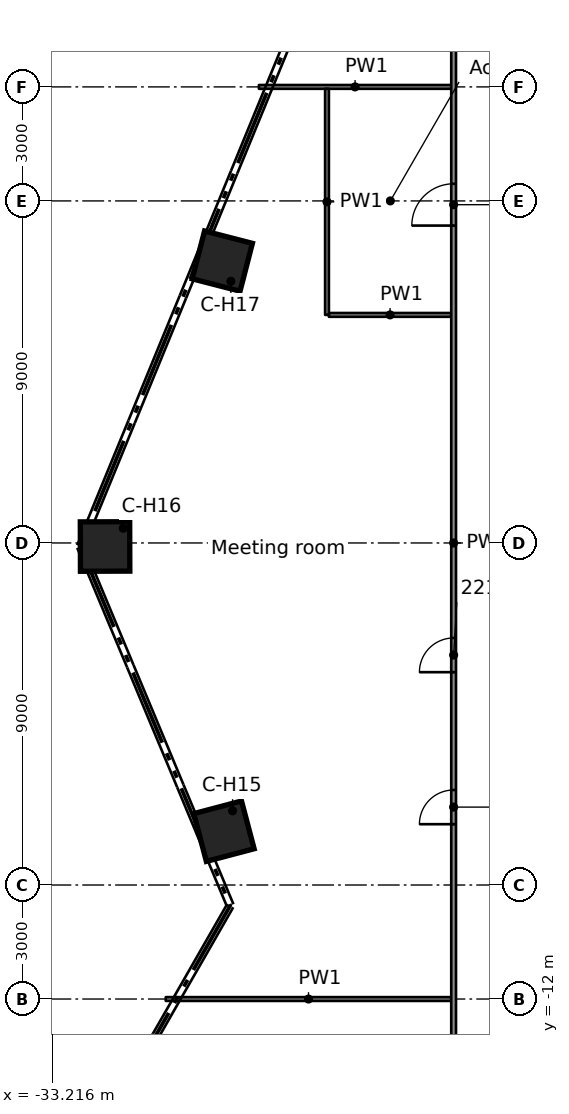
"""IFC4 building model, lengths in metres.
Left out: names, types, materials, properties, quantities, classifications, styles, units other than length and angle.
Written with IfcOpenShell. Run it as: python <this file> out.ifc"""

import sys

from ifc_helpers import new_model, si_unit, direction, frame, frame_2d, origin, origin_2d, place, context, subcontext, project, spatial, rectangle, extrude, element, fill, save


model = new_model("IFC4")
c1 = context("Model", 3, precision=1e-05, world=origin(), true_north=direction((0.0, 1.0)))
c2 = subcontext(c1, "Body", "Model", "MODEL_VIEW")
j1 = project(units=[si_unit("LENGTHUNIT", "METRE"), si_unit("PLANEANGLEUNIT", "RADIAN")], contexts=[c1])
p1 = place(None, origin())
s1 = spatial("IfcSite", under=j1, at=p1, CompositionType="ELEMENT")
p2 = place(p1, origin())
s2 = spatial("IfcBuilding", under=s1, at=p2, CompositionType="ELEMENT")
p3 = place(p2, frame((0.0, 0.0, 116.2)))
s3 = spatial("IfcBuildingStorey", under=s2, at=p3, CompositionType="ELEMENT", Elevation=116.2)
for number, where, z_axis, x_axis in (
    (1, (-28.694, -7.584, 0.0), (0.0, 0.0, 1.0), (-0.967, -0.256, 0.0)),
    (2, (-31.822, -0.093, 0.0), (0.0, 0.0, 1.0), (-1.0, -0.003, 0.0)),
    (3, (-28.737, 7.417, 0.0), (0.0, 0.0, 1.0), (-0.968, 0.25, 0.0)),
):
    element("IfcColumn", number, at=place(p3, frame(where, z_axis=z_axis, x_axis=x_axis)), inside=s3, PredefinedType="COLUMN", context=c2, shape_type="SweptSolid", body=[
        extrude(rectangle(XDim=1.3, YDim=1.3, at=origin_2d()), origin(), (0.0, 0.0, 1.0), 3.5),
    ])
p4 = place(p3, frame((-30.225, -12.0, 0.0), z_axis=(0.0, 0.0, 1.0), x_axis=(1.0, 0.0, 0.0)))
e4 = element("IfcWall", 4, at=p4, inside=s3, PredefinedType="PARTITIONING", context=c2, shape_type="SweptSolid", body=[
    extrude(rectangle(XDim=7.513, YDim=0.1, at=frame_2d((3.757, 0.0))), origin(), (0.0, 0.0, 1.0), 3.08),
])
p5 = place(p3, frame((-25.932, 6.001, 0.0), z_axis=(0.0, 0.0, 1.0), x_axis=(1.0, 0.0, 0.0)))
e5 = element("IfcWall", 5, at=p5, inside=s3, PredefinedType="PARTITIONING", context=c2, shape_type="SweptSolid", body=[
    extrude(rectangle(XDim=3.22, YDim=0.1, at=frame_2d((1.61, 0.0))), origin(), (0.0, 0.0, 1.0), 3.08),
])
p6 = place(p3, frame((-27.774, 12.0, 0.0), z_axis=(0.0, 0.0, 1.0), x_axis=(1.0, 0.0, 0.0)))
e6 = element("IfcWall", 6, at=p6, inside=s3, PredefinedType="PARTITIONING", context=c2, shape_type="SweptSolid", body=[
    extrude(rectangle(XDim=5.062, YDim=0.1, at=frame_2d((2.531, 0.0))), origin(), (0.0, 0.0, 1.0), 3.08),
])
p7 = place(p3, frame((-22.65, -15.651, 0.0), z_axis=(0.0, 0.0, 1.0), x_axis=(0.0, 1.0, 0.0)))
e7 = element("IfcWall", 7, at=p7, inside=s3, PredefinedType="PARTITIONING", context=c2, shape_type="SweptSolid", body=[
    extrude(rectangle(XDim=31.302, YDim=0.125, at=frame_2d((15.651, 0.0))), origin(), (0.0, 0.0, 1.0), 3.08),
])
p8 = place(p7, frame((8.251, 0.0, 0.0)))
e8 = element("IfcOpeningElement", 8, at=p8, cuts=e7, PredefinedType="OPENING", context=c2, shape_type="SweptSolid", body=[
    extrude(rectangle(XDim=0.9, YDim=2.1, at=frame_2d((0.45, 1.05))), frame((0.0, 0.073, 0.0), z_axis=(0.0, -1.0, 0.0), x_axis=(1.0, 0.0, 0.0)), (0.0, 0.0, 1.0), 0.145),
])
p9 = place(p7, frame((12.251, 0.0, 0.0)))
e9 = element("IfcOpeningElement", 9, at=p9, cuts=e7, PredefinedType="OPENING", context=c2, shape_type="SweptSolid", body=[
    extrude(rectangle(XDim=0.9, YDim=2.1, at=frame_2d((0.45, 1.05))), frame((0.0, 0.073, 0.0), z_axis=(0.0, -1.0, 0.0), x_axis=(1.0, 0.0, 0.0)), (0.0, 0.0, 1.0), 0.145),
])
p10 = place(p7, frame((24.002, 0.0, 0.0)))
e10 = element("IfcOpeningElement", 10, at=p10, cuts=e7, PredefinedType="OPENING", context=c2, shape_type="SweptSolid", body=[
    extrude(rectangle(XDim=1.1, YDim=2.1, at=frame_2d((0.55, 1.05))), frame((0.0, 0.073, 0.0), z_axis=(0.0, -1.0, 0.0), x_axis=(1.0, 0.0, 0.0)), (0.0, 0.0, 1.0), 0.145),
])
p11 = place(p3, frame((-25.982, 6.001, 0.0), z_axis=(0.0, 0.0, 1.0), x_axis=(0.0, 1.0, 0.0)))
e11 = element("IfcWall", 11, at=p11, inside=s3, PredefinedType="PARTITIONING", context=c2, shape_type="SweptSolid", body=[
    extrude(rectangle(XDim=5.949, YDim=0.1, at=frame_2d((2.975, 0.0))), origin(), (0.0, 0.0, 1.0), 3.08),
])
p12 = place(p8, origin())
e12 = element("IfcDoor", 12, at=p12, inside=s3, OperationType="SINGLE_SWING_LEFT", PredefinedType="DOOR", context=c2, shape_type="SweptSolid", body=[
    extrude(rectangle(XDim=0.9, YDim=2.1, at=frame_2d((0.45, 1.05))), frame((0.0, 0.025, 0.0), z_axis=(0.0, -1.0, 0.0), x_axis=(1.0, 0.0, 0.0)), (0.0, 0.0, 1.0), 0.05),
])
fill(e8, e12)
p13 = place(p9, origin())
e13 = element("IfcDoor", 13, at=p13, inside=s3, OperationType="SINGLE_SWING_LEFT", PredefinedType="DOOR", context=c2, shape_type="SweptSolid", body=[
    extrude(rectangle(XDim=0.9, YDim=2.1, at=frame_2d((0.45, 1.05))), frame((0.0, 0.025, 0.0), z_axis=(0.0, -1.0, 0.0), x_axis=(1.0, 0.0, 0.0)), (0.0, 0.0, 1.0), 0.05),
])
fill(e9, e13)
p14 = place(p10, origin())
e14 = element("IfcDoor", 14, at=p14, inside=s3, OperationType="SINGLE_SWING_RIGHT", PredefinedType="DOOR", context=c2, shape_type="SweptSolid", body=[
    extrude(rectangle(XDim=1.1, YDim=2.1, at=frame_2d((0.55, 1.05))), frame((0.0, 0.025, 0.0), z_axis=(0.0, -1.0, 0.0), x_axis=(1.0, 0.0, 0.0)), (0.0, 0.0, 1.0), 0.05),
])
fill(e10, e14)
save(model, sys.argv[1])
